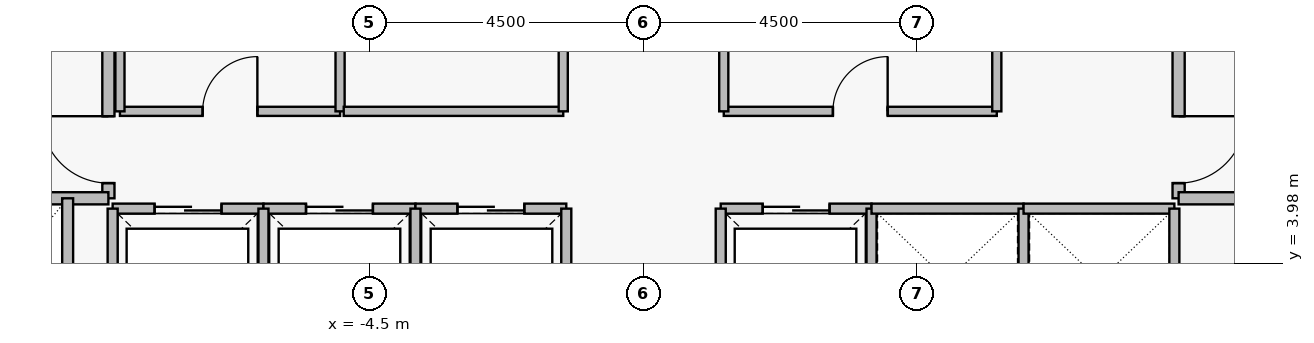
"""IFC4 building model, lengths in metres.
Left out: names, types, materials, properties, quantities, classifications, styles, units other than length and angle.
Written with IfcOpenShell. Run it as: python <this file> out.ifc"""

import sys

from ifc_helpers import new_model, si_unit, direction, frame, frame_2d, origin, place, context, subcontext, project, spatial, rectangle, extrude, element, fill, save


model = new_model("IFC4")
c1 = context("Model", 3, precision=1e-05, world=origin(), true_north=direction((0.0, 1.0)))
c2 = subcontext(c1, "Body", "Model", "MODEL_VIEW")
j1 = project(units=[si_unit("LENGTHUNIT", "METRE"), si_unit("PLANEANGLEUNIT", "RADIAN")], contexts=[c1])
p1 = place(None, origin())
s1 = spatial("IfcSite", under=j1, at=p1, CompositionType="ELEMENT")
p2 = place(p1, origin())
s2 = spatial("IfcBuilding", under=s1, at=p2, CompositionType="ELEMENT")
p3 = place(p2, frame((0.0, 0.0, 18.0)))
s3 = spatial("IfcBuildingStorey", under=s2, at=p3, CompositionType="ELEMENT", Elevation=18.0)
p4 = place(p3, frame((-8.8, 5.05, 0.0), z_axis=(0.0, 0.0, 1.0), x_axis=(0.0, 1.0, 0.0)))
e1 = element("IfcWall", 1, at=p4, inside=s3, PredefinedType="PARTITIONING", context=c2, shape_type="SweptSolid", body=[
    extrude(rectangle(XDim=6.1, YDim=0.2, at=frame_2d((3.05, 0.0))), origin(), (0.0, 0.0, 1.0), 4.54),
])
p5 = place(p4, frame((0.25, 0.0, 0.0)))
e2 = element("IfcOpeningElement", 2, at=p5, cuts=e1, PredefinedType="OPENING", context=c2, shape_type="SweptSolid", body=[
    extrude(rectangle(XDim=1.1, YDim=2.2, at=frame_2d((0.55, 1.1))), frame((0.0, 0.11, 0.0), z_axis=(0.0, -1.0, 0.0), x_axis=(1.0, 0.0, 0.0)), (0.0, 0.0, 1.0), 0.22),
])
p6 = place(p4, frame((3.85, 0.0, 0.0)))
e3 = element("IfcOpeningElement", 3, at=p6, cuts=e1, PredefinedType="OPENING", context=c2, shape_type="SweptSolid", body=[
    extrude(rectangle(XDim=1.1, YDim=2.2, at=frame_2d((0.55, 1.1))), frame((0.0, 0.11, 0.0), z_axis=(0.0, -1.0, 0.0), x_axis=(1.0, 0.0, 0.0)), (0.0, 0.0, 1.0), 0.22),
])
p7 = place(p3, frame((8.8, 11.15, 0.0), z_axis=(0.0, 0.0, 1.0), x_axis=(0.0, -1.0, 0.0)))
e4 = element("IfcWall", 4, at=p7, inside=s3, PredefinedType="PARTITIONING", context=c2, shape_type="SweptSolid", body=[
    extrude(rectangle(XDim=6.1, YDim=0.2, at=frame_2d((3.05, 0.0))), origin(), (0.0, 0.0, 1.0), 4.54),
])
p8 = place(p7, frame((1.15, 0.0, 0.0)))
e5 = element("IfcOpeningElement", 5, at=p8, cuts=e4, PredefinedType="OPENING", context=c2, shape_type="SweptSolid", body=[
    extrude(rectangle(XDim=1.1, YDim=2.2, at=frame_2d((0.55, 1.1))), frame((0.0, 0.11, 0.0), z_axis=(0.0, -1.0, 0.0), x_axis=(1.0, 0.0, 0.0)), (0.0, 0.0, 1.0), 0.22),
])
p9 = place(p7, frame((4.75, 0.0, 0.0)))
e6 = element("IfcOpeningElement", 6, at=p9, cuts=e4, PredefinedType="OPENING", context=c2, shape_type="SweptSolid", body=[
    extrude(rectangle(XDim=1.1, YDim=2.2, at=frame_2d((0.55, 1.1))), frame((0.0, 0.11, 0.0), z_axis=(0.0, -1.0, 0.0), x_axis=(1.0, 0.0, 0.0)), (0.0, 0.0, 1.0), 0.22),
])
p10 = place(p3, frame((-8.73, 4.88, 0.0), z_axis=(0.0, 0.0, 1.0), x_axis=(1.0, 0.0, 0.0)))
e7 = element("IfcWall", 7, at=p10, inside=s3, PredefinedType="PARTITIONING", context=c2, shape_type="SweptSolid", body=[
    extrude(rectangle(XDim=2.48, YDim=0.165, at=frame_2d((1.24, 0.0))), origin(), (0.0, 0.0, 1.0), 4.54),
])
p11 = place(p10, frame((0.69, 0.0, 0.0)))
e8 = element("IfcOpeningElement", 8, at=p11, cuts=e7, PredefinedType="OPENING", context=c2, shape_type="SweptSolid", body=[
    extrude(rectangle(XDim=1.1, YDim=2.25, at=frame_2d((0.55, 1.125))), frame((0.0, 0.093, 0.0), z_axis=(0.0, -1.0, 0.0), x_axis=(1.0, 0.0, 0.0)), (0.0, 0.0, 1.0), 0.185),
])
p12 = place(p3, frame((-6.25, 4.88, 0.0), z_axis=(0.0, 0.0, 1.0), x_axis=(1.0, 0.0, 0.0)))
e9 = element("IfcWall", 9, at=p12, inside=s3, PredefinedType="PARTITIONING", context=c2, shape_type="SweptSolid", body=[
    extrude(rectangle(XDim=2.5, YDim=0.165, at=frame_2d((1.25, 0.0))), origin(), (0.0, 0.0, 1.0), 4.54),
])
p13 = place(p12, frame((0.7, 0.0, 0.0)))
e10 = element("IfcOpeningElement", 10, at=p13, cuts=e9, PredefinedType="OPENING", context=c2, shape_type="SweptSolid", body=[
    extrude(rectangle(XDim=1.1, YDim=2.25, at=frame_2d((0.55, 1.125))), frame((0.0, 0.093, 0.0), z_axis=(0.0, -1.0, 0.0), x_axis=(1.0, 0.0, 0.0)), (0.0, 0.0, 1.0), 0.185),
])
p14 = place(p3, frame((-3.75, 4.88, 0.0), z_axis=(0.0, 0.0, 1.0), x_axis=(1.0, 0.0, 0.0)))
e11 = element("IfcWall", 11, at=p14, inside=s3, PredefinedType="PARTITIONING", context=c2, shape_type="SweptSolid", body=[
    extrude(rectangle(XDim=2.48, YDim=0.165, at=frame_2d((1.24, 0.0))), origin(), (0.0, 0.0, 1.0), 4.54),
])
p15 = place(p14, frame((0.69, 0.0, 0.0)))
e12 = element("IfcOpeningElement", 12, at=p15, cuts=e11, PredefinedType="OPENING", context=c2, shape_type="SweptSolid", body=[
    extrude(rectangle(XDim=1.1, YDim=2.25, at=frame_2d((0.55, 1.125))), frame((0.0, 0.093, 0.0), z_axis=(0.0, -1.0, 0.0), x_axis=(1.0, 0.0, 0.0)), (0.0, 0.0, 1.0), 0.185),
])
p16 = place(p3, frame((1.27, 4.88, 0.0), z_axis=(0.0, 0.0, 1.0), x_axis=(1.0, 0.0, 0.0)))
e13 = element("IfcWall", 13, at=p16, inside=s3, PredefinedType="PARTITIONING", context=c2, shape_type="SweptSolid", body=[
    extrude(rectangle(XDim=2.48, YDim=0.165, at=frame_2d((1.24, 0.0))), origin(), (0.0, 0.0, 1.0), 4.54),
])
p17 = place(p16, frame((0.69, 0.0, 0.0)))
e14 = element("IfcOpeningElement", 14, at=p17, cuts=e13, PredefinedType="OPENING", context=c2, shape_type="SweptSolid", body=[
    extrude(rectangle(XDim=1.1, YDim=2.25, at=frame_2d((0.55, 1.125))), frame((0.0, 0.093, 0.0), z_axis=(0.0, -1.0, 0.0), x_axis=(1.0, 0.0, 0.0)), (0.0, 0.0, 1.0), 0.185),
])
p18 = place(p3, frame((-8.61, 6.48, 0.0), z_axis=(0.0, 0.0, 1.0), x_axis=(1.0, 0.0, 0.0)))
e15 = element("IfcWall", 15, at=p18, inside=s3, PredefinedType="PARTITIONING", context=c2, shape_type="SweptSolid", body=[
    extrude(rectangle(XDim=3.62, YDim=0.15, at=frame_2d((1.81, 0.0))), origin(), (0.0, 0.0, 1.0), 4.54),
])
p19 = place(p18, frame((1.36, 0.0, 0.0)))
e16 = element("IfcOpeningElement", 16, at=p19, cuts=e15, PredefinedType="OPENING", context=c2, shape_type="SweptSolid", body=[
    extrude(rectangle(XDim=0.9, YDim=2.15, at=frame_2d((0.45, 1.075))), frame((0.0, 0.085, 0.0), z_axis=(0.0, -1.0, 0.0), x_axis=(1.0, 0.0, 0.0)), (0.0, 0.0, 1.0), 0.17),
])
p20 = place(p3, frame((1.32, 6.48, 0.0), z_axis=(0.0, 0.0, 1.0), x_axis=(1.0, 0.0, 0.0)))
e17 = element("IfcWall", 17, at=p20, inside=s3, PredefinedType="PARTITIONING", context=c2, shape_type="SweptSolid", body=[
    extrude(rectangle(XDim=4.49, YDim=0.15, at=frame_2d((2.245, 0.0))), origin(), (0.0, 0.0, 1.0), 4.54),
])
p21 = place(p20, frame((1.795, 0.0, 0.0)))
e18 = element("IfcOpeningElement", 18, at=p21, cuts=e17, PredefinedType="OPENING", context=c2, shape_type="SweptSolid", body=[
    extrude(rectangle(XDim=0.9, YDim=2.15, at=frame_2d((0.45, 1.075))), frame((0.0, 0.085, 0.0), z_axis=(0.0, -1.0, 0.0), x_axis=(1.0, 0.0, 0.0)), (0.0, 0.0, 1.0), 0.17),
])
for number, where, z_axis, x_axis in (
    (19, (-11.65, 5.05, 0.0), (0.0, 0.0, 1.0), (1.0, 0.0, 0.0)),
    (20, (8.8, 5.05, 0.0), (0.0, 0.0, 1.0), (1.0, 0.0, 0.0)),
):
    element("IfcWall", number, at=place(p3, frame(where, z_axis=z_axis, x_axis=x_axis)), inside=s3, PredefinedType="PARTITIONING", context=c2, shape_type="SweptSolid", body=[
        extrude(rectangle(XDim=2.85, YDim=0.2, at=frame_2d((1.425, 0.0))), origin(), (0.0, 0.0, 1.0), 4.54),
    ])
for number, where, z_axis, x_axis in (
    (21, (-8.73, 2.52, 0.0), (0.0, 0.0, 1.0), (0.0, 1.0, 0.0)),
    (22, (-6.25, 2.52, 0.0), (0.0, 0.0, 1.0), (0.0, 1.0, 0.0)),
    (23, (-3.75, 2.52, 0.0), (0.0, 0.0, 1.0), (0.0, 1.0, 0.0)),
    (24, (-1.27, 2.52, 0.0), (0.0, 0.0, 1.0), (0.0, 1.0, 0.0)),
    (25, (1.27, 2.52, 0.0), (0.0, 0.0, 1.0), (0.0, 1.0, 0.0)),
    (26, (3.75, 2.52, 0.0), (0.0, 0.0, 1.0), (0.0, 1.0, 0.0)),
):
    element("IfcWall", number, at=place(p3, frame(where, z_axis=z_axis, x_axis=x_axis)), inside=s3, PredefinedType="PARTITIONING", context=c2, shape_type="SweptSolid", body=[
        extrude(rectangle(XDim=2.36, YDim=0.165, at=frame_2d((1.18, 0.0))), origin(), (0.0, 0.0, 1.0), 4.54),
    ])
p22 = place(p3, frame((3.75, 4.88, 0.0), z_axis=(0.0, 0.0, 1.0), x_axis=(1.0, 0.0, 0.0)))
e27 = element("IfcWall", 27, at=p22, inside=s3, PredefinedType="PARTITIONING", context=c2, shape_type="SweptSolid", body=[
    extrude(rectangle(XDim=2.5, YDim=0.165, at=frame_2d((1.25, 0.0))), origin(), (0.0, 0.0, 1.0), 4.54),
])
p23 = place(p3, frame((6.25, 2.52, 0.0), z_axis=(0.0, 0.0, 1.0), x_axis=(0.0, 1.0, 0.0)))
e28 = element("IfcWall", 28, at=p23, inside=s3, PredefinedType="PARTITIONING", context=c2, shape_type="SweptSolid", body=[
    extrude(rectangle(XDim=2.36, YDim=0.165, at=frame_2d((1.18, 0.0))), origin(), (0.0, 0.0, 1.0), 4.54),
])
p24 = place(p3, frame((6.25, 4.88, 0.0), z_axis=(0.0, 0.0, 1.0), x_axis=(1.0, 0.0, 0.0)))
e29 = element("IfcWall", 29, at=p24, inside=s3, PredefinedType="PARTITIONING", context=c2, shape_type="SweptSolid", body=[
    extrude(rectangle(XDim=2.48, YDim=0.165, at=frame_2d((1.24, 0.0))), origin(), (0.0, 0.0, 1.0), 4.54),
])
p25 = place(p3, frame((8.73, 2.52, 0.0), z_axis=(0.0, 0.0, 1.0), x_axis=(0.0, 1.0, 0.0)))
e30 = element("IfcWall", 30, at=p25, inside=s3, PredefinedType="PARTITIONING", context=c2, shape_type="SweptSolid", body=[
    extrude(rectangle(XDim=2.36, YDim=0.165, at=frame_2d((1.18, 0.0))), origin(), (0.0, 0.0, 1.0), 4.54),
])
p26 = place(p3, frame((-9.47, 2.45, 0.0), z_axis=(0.0, 0.0, 1.0), x_axis=(0.0, 1.0, 0.0)))
e31 = element("IfcWall", 31, at=p26, inside=s3, PredefinedType="PARTITIONING", context=c2, shape_type="SweptSolid", body=[
    extrude(rectangle(XDim=2.6, YDim=0.18, at=frame_2d((1.3, 0.0))), origin(), (0.0, 0.0, 1.0), 4.54),
])
for number, where, z_axis, x_axis in (
    (32, (-8.61, 6.48, 0.0), (0.0, 0.0, 1.0), (0.0, 1.0, 0.0)),
    (33, (-4.99, 6.48, 0.0), (0.0, 0.0, 1.0), (0.0, 1.0, 0.0)),
):
    element("IfcWall", number, at=place(p3, frame(where, z_axis=z_axis, x_axis=x_axis)), inside=s3, PredefinedType="PARTITIONING", context=c2, shape_type="SweptSolid", body=[
        extrude(rectangle(XDim=2.24, YDim=0.15, at=frame_2d((1.12, 0.0))), origin(), (0.0, 0.0, 1.0), 4.54),
    ])
p27 = place(p3, frame((-4.93, 6.48, 0.0), z_axis=(0.0, 0.0, 1.0), x_axis=(1.0, 0.0, 0.0)))
e34 = element("IfcWall", 34, at=p27, inside=s3, PredefinedType="PARTITIONING", context=c2, shape_type="SweptSolid", body=[
    extrude(rectangle(XDim=3.61, YDim=0.15, at=frame_2d((1.805, 0.0))), origin(), (0.0, 0.0, 1.0), 4.54),
])
for number, where, z_axis, x_axis in (
    (35, (-1.32, 6.48, 0.0), (0.0, 0.0, 1.0), (0.0, 1.0, 0.0)),
    (36, (1.32, 6.48, 0.0), (0.0, 0.0, 1.0), (0.0, 1.0, 0.0)),
    (37, (5.81, 6.48, 0.0), (0.0, 0.0, 1.0), (0.0, 1.0, 0.0)),
):
    element("IfcWall", number, at=place(p3, frame(where, z_axis=z_axis, x_axis=x_axis)), inside=s3, PredefinedType="PARTITIONING", context=c2, shape_type="SweptSolid", body=[
        extrude(rectangle(XDim=2.24, YDim=0.15, at=frame_2d((1.12, 0.0))), origin(), (0.0, 0.0, 1.0), 4.54),
    ])
p28 = place(p5, origin())
e38 = element("IfcDoor", 38, at=p28, inside=s3, OperationType="SINGLE_SWING_RIGHT", PredefinedType="DOOR", context=c2, shape_type="SweptSolid", body=[
    extrude(rectangle(XDim=1.1, YDim=2.2, at=frame_2d((0.55, 1.1))), frame((0.0, 0.025, 0.0), z_axis=(0.0, -1.0, 0.0), x_axis=(1.0, 0.0, 0.0)), (0.0, 0.0, 1.0), 0.05),
])
fill(e2, e38)
p29 = place(p9, origin())
e39 = element("IfcDoor", 39, at=p29, inside=s3, OperationType="SINGLE_SWING_LEFT", PredefinedType="DOOR", context=c2, shape_type="SweptSolid", body=[
    extrude(rectangle(XDim=1.1, YDim=2.2, at=frame_2d((0.55, 1.1))), frame((0.0, 0.025, 0.0), z_axis=(0.0, -1.0, 0.0), x_axis=(1.0, 0.0, 0.0)), (0.0, 0.0, 1.0), 0.05),
])
fill(e6, e39)
p30 = place(p11, origin())
e40 = element("IfcDoor", 40, at=p30, inside=s3, OperationType="SLIDING_TO_LEFT", PredefinedType="DOOR", context=c2, shape_type="SweptSolid", body=[
    extrude(rectangle(XDim=1.1, YDim=2.25, at=frame_2d((0.55, 1.125))), frame((0.0, 0.025, 0.0), z_axis=(0.0, -1.0, 0.0), x_axis=(1.0, 0.0, 0.0)), (0.0, 0.0, 1.0), 0.05),
])
fill(e8, e40)
p31 = place(p13, origin())
e41 = element("IfcDoor", 41, at=p31, inside=s3, OperationType="SLIDING_TO_LEFT", PredefinedType="DOOR", context=c2, shape_type="SweptSolid", body=[
    extrude(rectangle(XDim=1.1, YDim=2.25, at=frame_2d((0.55, 1.125))), frame((0.0, 0.025, 0.0), z_axis=(0.0, -1.0, 0.0), x_axis=(1.0, 0.0, 0.0)), (0.0, 0.0, 1.0), 0.05),
])
fill(e10, e41)
p32 = place(p15, origin())
e42 = element("IfcDoor", 42, at=p32, inside=s3, OperationType="SLIDING_TO_LEFT", PredefinedType="DOOR", context=c2, shape_type="SweptSolid", body=[
    extrude(rectangle(XDim=1.1, YDim=2.25, at=frame_2d((0.55, 1.125))), frame((0.0, 0.025, 0.0), z_axis=(0.0, -1.0, 0.0), x_axis=(1.0, 0.0, 0.0)), (0.0, 0.0, 1.0), 0.05),
])
fill(e12, e42)
p33 = place(p17, origin())
e43 = element("IfcDoor", 43, at=p33, inside=s3, OperationType="SLIDING_TO_LEFT", PredefinedType="DOOR", context=c2, shape_type="SweptSolid", body=[
    extrude(rectangle(XDim=1.1, YDim=2.25, at=frame_2d((0.55, 1.125))), frame((0.0, 0.025, 0.0), z_axis=(0.0, -1.0, 0.0), x_axis=(1.0, 0.0, 0.0)), (0.0, 0.0, 1.0), 0.05),
])
fill(e14, e43)
p34 = place(p19, origin())
e44 = element("IfcDoor", 44, at=p34, inside=s3, OperationType="SINGLE_SWING_RIGHT", PredefinedType="DOOR", context=c2, shape_type="SweptSolid", body=[
    extrude(rectangle(XDim=0.9, YDim=2.15, at=frame_2d((0.45, 1.075))), frame((0.0, 0.025, 0.0), z_axis=(0.0, -1.0, 0.0), x_axis=(1.0, 0.0, 0.0)), (0.0, 0.0, 1.0), 0.05),
])
fill(e16, e44)
p35 = place(p21, origin())
e45 = element("IfcDoor", 45, at=p35, inside=s3, OperationType="SINGLE_SWING_RIGHT", PredefinedType="DOOR", context=c2, shape_type="SweptSolid", body=[
    extrude(rectangle(XDim=0.9, YDim=2.15, at=frame_2d((0.45, 1.075))), frame((0.0, 0.025, 0.0), z_axis=(0.0, -1.0, 0.0), x_axis=(1.0, 0.0, 0.0)), (0.0, 0.0, 1.0), 0.05),
])
fill(e18, e45)
save(model, sys.argv[1])
